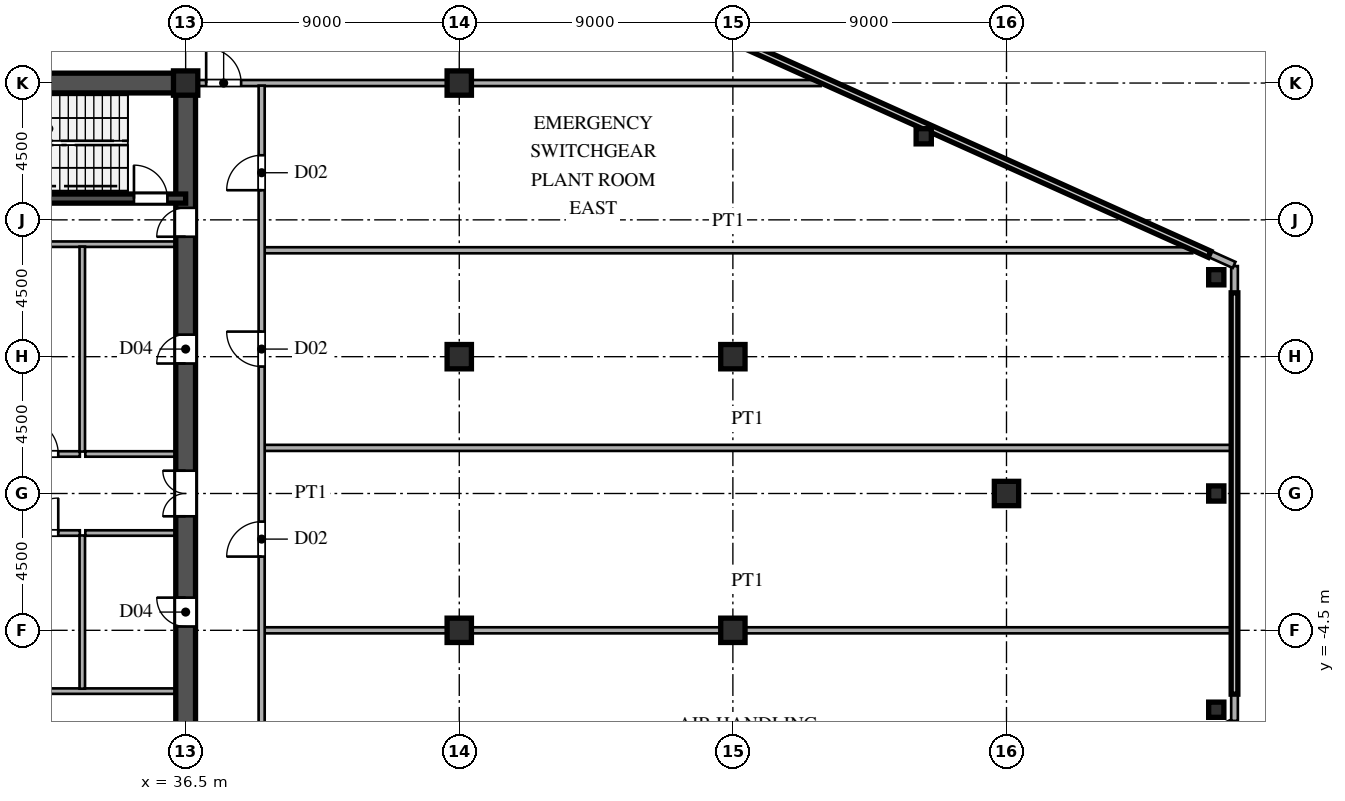
"""IFC4 building model, lengths in metres.
Left out: names, types, materials, properties, quantities, classifications, styles, units other than length and angle.
Written with IfcOpenShell. Run it as: python <this file> out.ifc"""

import sys

from ifc_helpers import new_model, si_unit, direction, frame, frame_2d, origin, origin_2d, place, context, subcontext, project, spatial, rectangle, hollow_rectangle, i_section, extrude, source, transform, mapped, element, fill, save


model = new_model("IFC4")
c1 = context("Model", 3, precision=1e-05, world=origin(), true_north=direction((0.0, 1.0)))
c2 = subcontext(c1, "Body", "Model", "MODEL_VIEW")
j1 = project(units=[si_unit("LENGTHUNIT", "METRE"), si_unit("PLANEANGLEUNIT", "RADIAN")], contexts=[c1])
p1 = place(None, origin())
s1 = spatial("IfcSite", under=j1, at=p1, CompositionType="ELEMENT")
p2 = place(p1, origin())
s2 = spatial("IfcBuilding", under=s1, at=p2, CompositionType="ELEMENT")
p3 = place(p2, frame((0.0, 0.0, 87.3)))
s3 = spatial("IfcBuildingStorey", under=s2, at=p3, CompositionType="ELEMENT", Elevation=87.3)
m1 = source(origin(), c2, "Body", "SweptSolid", [
    extrude(i_section(OverallWidth=0.8, OverallDepth=0.8, WebThickness=0.032, FlangeThickness=0.05, at=origin_2d()), origin(), (0.0, 0.0, 1.0), 5.1),
])
for number, where, z_axis, x_axis in (
    (1, (36.5, 13.5, 0.0), (0.0, 0.0, 1.0), (1.0, 0.0, 0.0)),
    (2, (45.5, -4.5, 0.0), (0.0, 0.0, 1.0), (1.0, 0.0, 0.0)),
    (3, (45.5, 4.5, 0.0), (0.0, 0.0, 1.0), (1.0, 0.0, 0.0)),
    (4, (45.5, 13.5, 0.0), (0.0, 0.0, 1.0), (1.0, 0.0, 0.0)),
    (5, (54.5, -4.5, 0.0), (0.0, 0.0, 1.0), (1.0, 0.0, 0.0)),
    (6, (54.5, 4.5, 0.0), (0.0, 0.0, 1.0), (1.0, 0.0, 0.0)),
    (7, (63.5, 0.0, 0.0), (0.0, 0.0, 1.0), (1.0, 0.0, 0.0)),
):
    element("IfcColumn", number, at=place(p3, frame(where, z_axis=z_axis, x_axis=x_axis)), inside=s3, PredefinedType="COLUMN", context=c2, shape_type="MappedRepresentation", body=[
        mapped(m1, transform((0.0, 0.0, 0.0), scale=1.0)),
    ])
m2 = source(origin(), c2, "Body", "SweptSolid", [
    extrude(hollow_rectangle(XDim=0.5, YDim=0.5, WallThickness=0.02, at=origin_2d()), origin(), (0.0, 0.0, 1.0), 5.1),
])
for number, where, z_axis, x_axis in (
    (8, (70.4, -7.112, 0.0), (0.0, 0.0, 1.0), (1.0, 0.0, 0.0)),
    (9, (70.4, 7.112, 0.0), (0.0, 0.0, 1.0), (1.0, 0.0, 0.0)),
    (10, (60.778, 11.749, 0.0), (0.0, 0.0, 1.0), (1.0, 0.0, 0.0)),
    (11, (70.4, 0.0, 0.0), (0.0, 0.0, 1.0), (1.0, 0.0, 0.0)),
):
    element("IfcColumn", number, at=place(p3, frame(where, z_axis=z_axis, x_axis=x_axis)), inside=s3, PredefinedType="COLUMN", context=c2, shape_type="MappedRepresentation", body=[
        mapped(m2, transform((0.0, 0.0, 0.0), scale=1.0)),
    ])
p4 = place(p3, frame((31.018, -25.492, 0.0), z_axis=(0.0, 0.0, 1.0), x_axis=(0.911922547569, 0.410362360889, 0.0)))
e12 = element("IfcWall", 12, at=p4, inside=s3, PredefinedType="PARAPET", context=c2, shape_type="SweptSolid", body=[
    extrude(rectangle(XDim=43.823, YDim=0.22, at=frame_2d((21.912, 0.0))), origin(), (0.0, 0.0, 1.0), 1.25),
])
p5 = place(p3, frame((71.0, -7.48, 0.0), z_axis=(0.0, 0.0, 1.0), x_axis=(0.0, 1.0, 0.0)))
e13 = element("IfcWall", 13, at=p5, inside=s3, PredefinedType="PARAPET", context=c2, shape_type="SweptSolid", body=[
    extrude(rectangle(XDim=14.96, YDim=0.22, at=frame_2d((7.48, 0.0))), origin(), (0.0, 0.0, 1.0), 1.25),
])
p6 = place(p3, frame((70.982, 7.508, 0.0), z_axis=(0.0, 0.0, 1.0), x_axis=(-0.911922547569, 0.410362360889, 0.0)))
e14 = element("IfcWall", 14, at=p6, inside=s3, PredefinedType="PARAPET", context=c2, shape_type="SweptSolid", body=[
    extrude(rectangle(XDim=43.823, YDim=0.22, at=frame_2d((21.912, 0.0))), origin(), (0.0, 0.0, 1.0), 1.25),
])
p7 = place(p3, frame((27.5, 13.5, 0.0), z_axis=(0.0, 0.0, 1.0), x_axis=(1.0, 0.0, 0.0)))
e15 = element("IfcWall", 15, at=p7, inside=s3, PredefinedType="SHEAR", context=c2, shape_type="SweptSolid", body=[
    extrude(rectangle(XDim=9.0, YDim=0.65, at=frame_2d((4.5, 0.0))), origin(), (0.0, 0.0, 1.0), 4.88),
])
p8 = place(p3, frame((36.5, -13.65, 0.0), z_axis=(0.0, 0.0, 1.0), x_axis=(0.0, 1.0, 0.0)))
e16 = element("IfcWall", 16, at=p8, inside=s3, PredefinedType="SHEAR", context=c2, shape_type="SweptSolid", body=[
    extrude(rectangle(XDim=7.15, YDim=0.65, at=frame_2d((3.575, 0.0))), origin(), (0.0, 0.0, 1.0), 4.88),
])
p9 = place(p8, frame((4.675, 0.0, 0.0)))
e17 = element("IfcOpeningElement", 17, at=p9, cuts=e16, PredefinedType="OPENING", context=c2, shape_type="SweptSolid", body=[
    extrude(rectangle(XDim=1.15, YDim=2.2, at=frame_2d((0.575, 1.1))), frame((0.0, 0.335, 0.0), z_axis=(0.0, -1.0, 0.0), x_axis=(1.0, 0.0, 0.0)), (0.0, 0.0, 1.0), 0.67),
])
p10 = place(p3, frame((36.5, -1.3, 0.0), z_axis=(0.0, 0.0, 1.0), x_axis=(0.0, 1.0, 0.0)))
e18 = element("IfcWall", 18, at=p10, inside=s3, PredefinedType="SHEAR", context=c2, shape_type="SweptSolid", body=[
    extrude(rectangle(XDim=2.6, YDim=0.65, at=frame_2d((1.3, 0.0))), origin(), (0.0, 0.0, 1.0), 4.88),
])
p11 = place(p10, frame((0.55, 0.0, 0.0)))
e19 = element("IfcOpeningElement", 19, at=p11, cuts=e18, PredefinedType="OPENING", context=c2, shape_type="SweptSolid", body=[
    extrude(rectangle(XDim=1.5, YDim=2.3, at=frame_2d((0.75, 1.15))), frame((0.0, 0.335, 0.0), z_axis=(0.0, -1.0, 0.0), x_axis=(1.0, 0.0, 0.0)), (0.0, 0.0, 1.0), 0.67),
])
p12 = place(p3, frame((36.5, 8.2, 0.0), z_axis=(0.0, 0.0, 1.0), x_axis=(0.0, 1.0, 0.0)))
e20 = element("IfcWall", 20, at=p12, inside=s3, PredefinedType="SHEAR", context=c2, shape_type="SweptSolid", body=[
    extrude(rectangle(XDim=5.45, YDim=0.65, at=frame_2d((2.725, 0.0))), origin(), (0.0, 0.0, 1.0), 4.88),
])
p13 = place(p12, frame((0.245, 0.0, 0.0)))
e21 = element("IfcOpeningElement", 21, at=p13, cuts=e20, PredefinedType="OPENING", context=c2, shape_type="SweptSolid", body=[
    extrude(rectangle(XDim=0.95, YDim=2.15, at=frame_2d((0.475, 1.075))), frame((0.0, 0.335, 0.0), z_axis=(0.0, -1.0, 0.0), x_axis=(1.0, 0.0, 0.0)), (0.0, 0.0, 1.0), 0.67),
])
p14 = place(p3, frame((36.5, -6.5, 0.0), z_axis=(0.0, 0.0, 1.0), x_axis=(0.0, 1.0, 0.0)))
e22 = element("IfcWall", 22, at=p14, inside=s3, PredefinedType="SHEAR", context=c2, shape_type="SweptSolid", body=[
    extrude(rectangle(XDim=5.2, YDim=0.65, at=frame_2d((2.6, 0.0))), origin(), (0.0, 0.0, 1.0), 4.88),
])
p15 = place(p14, frame((2.125, 0.0, 0.0)))
e23 = element("IfcOpeningElement", 23, at=p15, cuts=e22, PredefinedType="OPENING", context=c2, shape_type="SweptSolid", body=[
    extrude(rectangle(XDim=0.95, YDim=2.15, at=frame_2d((0.475, 1.075))), frame((0.0, 0.335, 0.0), z_axis=(0.0, -1.0, 0.0), x_axis=(1.0, 0.0, 0.0)), (0.0, 0.0, 1.0), 0.67),
])
p16 = place(p3, frame((36.5, 1.3, 0.0), z_axis=(0.0, 0.0, 1.0), x_axis=(0.0, 1.0, 0.0)))
e24 = element("IfcWall", 24, at=p16, inside=s3, PredefinedType="SHEAR", context=c2, shape_type="SweptSolid", body=[
    extrude(rectangle(XDim=6.9, YDim=0.65, at=frame_2d((3.45, 0.0))), origin(), (0.0, 0.0, 1.0), 4.88),
])
p17 = place(p16, frame((2.975, 0.0, 0.0)))
e25 = element("IfcOpeningElement", 25, at=p17, cuts=e24, PredefinedType="OPENING", context=c2, shape_type="SweptSolid", body=[
    extrude(rectangle(XDim=0.95, YDim=2.15, at=frame_2d((0.475, 1.075))), frame((0.0, 0.335, 0.0), z_axis=(0.0, -1.0, 0.0), x_axis=(1.0, 0.0, 0.0)), (0.0, 0.0, 1.0), 0.67),
])
p18 = place(p3, frame((27.5, 9.7, 0.0), z_axis=(0.0, 0.0, 1.0), x_axis=(1.0, 0.0, 0.0)))
e26 = element("IfcWall", 26, at=p18, inside=s3, PredefinedType="SHEAR", context=c2, shape_type="SweptSolid", body=[
    extrude(rectangle(XDim=9.0, YDim=0.3, at=frame_2d((4.5, 0.0))), origin(), (0.0, 0.0, 1.0), 4.88),
])
p19 = place(p18, frame((7.3, 0.0, 0.0)))
e27 = element("IfcOpeningElement", 27, at=p19, cuts=e26, PredefinedType="OPENING", context=c2, shape_type="SweptSolid", body=[
    extrude(rectangle(XDim=1.1, YDim=2.2, at=frame_2d((0.55, 1.1))), frame((0.0, 0.16, 0.0), z_axis=(0.0, -1.0, 0.0), x_axis=(1.0, 0.0, 0.0)), (0.0, 0.0, 1.0), 0.32),
])
for number, where, z_axis, x_axis in (
    (28, (30.45, -6.5, 0.0), (0.0, 0.0, 1.0), (1.0, 0.0, 0.0)),
    (29, (30.45, 8.2, 0.0), (0.0, 0.0, 1.0), (1.0, 0.0, 0.0)),
):
    element("IfcWall", number, at=place(p3, frame(where, z_axis=z_axis, x_axis=x_axis)), inside=s3, PredefinedType="PARTITIONING", context=c2, shape_type="SweptSolid", body=[
        extrude(rectangle(XDim=5.7, YDim=0.18, at=frame_2d((2.85, 0.0))), origin(), (0.0, 0.0, 1.0), 4.88),
    ])
p20 = place(p3, frame((33.1, -6.42, 0.0), z_axis=(0.0, 0.0, 1.0), x_axis=(0.0, 1.0, 0.0)))
e30 = element("IfcWall", 30, at=p20, inside=s3, PredefinedType="PARTITIONING", context=c2, shape_type="SweptSolid", body=[
    extrude(rectangle(XDim=5.04, YDim=0.18, at=frame_2d((2.52, 0.0))), origin(), (0.0, 0.0, 1.0), 4.88),
])
p21 = place(p3, frame((33.1, 1.38, 0.0), z_axis=(0.0, 0.0, 1.0), x_axis=(0.0, 1.0, 0.0)))
e31 = element("IfcWall", 31, at=p21, inside=s3, PredefinedType="PARTITIONING", context=c2, shape_type="SweptSolid", body=[
    extrude(rectangle(XDim=6.74, YDim=0.18, at=frame_2d((3.37, 0.0))), origin(), (0.0, 0.0, 1.0), 4.88),
])
p22 = place(p3, frame((30.45, -1.3, 0.0), z_axis=(0.0, 0.0, 1.0), x_axis=(1.0, 0.0, 0.0)))
e32 = element("IfcWall", 32, at=p22, inside=s3, PredefinedType="PARTITIONING", context=c2, shape_type="SweptSolid", body=[
    extrude(rectangle(XDim=2.57, YDim=0.18, at=frame_2d((1.285, 0.0))), origin(), (0.0, 0.0, 1.0), 4.88),
])
p23 = place(p22, frame((0.71, 0.0, 0.0)))
e33 = element("IfcOpeningElement", 33, at=p23, cuts=e32, PredefinedType="OPENING", context=c2, shape_type="SweptSolid", body=[
    extrude(rectangle(XDim=1.15, YDim=2.2, at=frame_2d((0.575, 1.1))), frame((0.0, 0.1, 0.0), z_axis=(0.0, -1.0, 0.0), x_axis=(1.0, 0.0, 0.0)), (0.0, 0.0, 1.0), 0.2),
])
p24 = place(p3, frame((30.45, 1.3, 0.0), z_axis=(0.0, 0.0, 1.0), x_axis=(1.0, 0.0, 0.0)))
e34 = element("IfcWall", 34, at=p24, inside=s3, PredefinedType="PARTITIONING", context=c2, shape_type="SweptSolid", body=[
    extrude(rectangle(XDim=2.57, YDim=0.18, at=frame_2d((1.285, 0.0))), origin(), (0.0, 0.0, 1.0), 4.88),
])
p25 = place(p24, frame((0.71, 0.0, 0.0)))
e35 = element("IfcOpeningElement", 35, at=p25, cuts=e34, PredefinedType="OPENING", context=c2, shape_type="SweptSolid", body=[
    extrude(rectangle(XDim=1.15, YDim=2.2, at=frame_2d((0.575, 1.1))), frame((0.0, 0.1, 0.0), z_axis=(0.0, -1.0, 0.0), x_axis=(1.0, 0.0, 0.0)), (0.0, 0.0, 1.0), 0.2),
])
for number, where, z_axis, x_axis in (
    (36, (33.2, -1.3, 0.0), (0.0, 0.0, 1.0), (1.0, 0.0, 0.0)),
    (37, (33.2, 1.3, 0.0), (0.0, 0.0, 1.0), (1.0, 0.0, 0.0)),
):
    element("IfcWall", number, at=place(p3, frame(where, z_axis=z_axis, x_axis=x_axis)), inside=s3, PredefinedType="PARTITIONING", context=c2, shape_type="SweptSolid", body=[
        extrude(rectangle(XDim=2.95, YDim=0.18, at=frame_2d((1.475, 0.0))), origin(), (0.0, 0.0, 1.0), 4.88),
    ])
p26 = place(p3, frame((39.085, -4.5, 0.0), z_axis=(0.0, 0.0, 1.0), x_axis=(1.0, 0.0, 0.0)))
e38 = element("IfcWall", 38, at=p26, inside=s3, PredefinedType="PARTITIONING", context=c2, shape_type="SweptSolid", body=[
    extrude(rectangle(XDim=15.435, YDim=0.2, at=frame_2d((7.718, 0.0))), origin(), (0.0, 0.0, 1.0), 4.18),
])
p27 = place(p3, frame((54.52, -4.5, 0.0), z_axis=(0.0, 0.0, 1.0), x_axis=(1.0, 0.0, 0.0)))
e39 = element("IfcWall", 39, at=p27, inside=s3, PredefinedType="PARTITIONING", context=c2, shape_type="SweptSolid", body=[
    extrude(rectangle(XDim=16.365, YDim=0.2, at=frame_2d((8.183, 0.0))), origin(), (0.0, 0.0, 1.0), 4.88),
])
p28 = place(p3, frame((39.085, 1.5, 0.0), z_axis=(0.0, 0.0, 1.0), x_axis=(1.0, 0.0, 0.0)))
e40 = element("IfcWall", 40, at=p28, inside=s3, PredefinedType="PARTITIONING", context=c2, shape_type="SweptSolid", body=[
    extrude(rectangle(XDim=31.8, YDim=0.2, at=frame_2d((15.9, 0.0))), origin(), (0.0, 0.0, 1.0), 4.88),
])
p29 = place(p3, frame((39.085, 8.0, 0.0), z_axis=(0.0, 0.0, 1.0), x_axis=(1.0, 0.0, 0.0)))
e41 = element("IfcWall", 41, at=p29, inside=s3, PredefinedType="PARTITIONING", context=c2, shape_type="SweptSolid", body=[
    extrude(rectangle(XDim=30.524, YDim=0.2, at=frame_2d((15.262, 0.0))), origin(), (0.0, 0.0, 1.0), 4.88),
])
p30 = place(p3, frame((36.83, 13.5, 0.0), z_axis=(0.0, 0.0, 1.0), x_axis=(1.0, 0.0, 0.0)))
e42 = element("IfcWall", 42, at=p30, inside=s3, PredefinedType="PARTITIONING", context=c2, shape_type="SweptSolid", body=[
    extrude(rectangle(XDim=8.69, YDim=0.2, at=frame_2d((4.345, 0.0))), origin(), (0.0, 0.0, 1.0), 4.18),
])
p31 = place(p30, frame((0.345, 0.0, 0.0)))
e43 = element("IfcOpeningElement", 43, at=p31, cuts=e42, PredefinedType="OPENING", context=c2, shape_type="SweptSolid", body=[
    extrude(rectangle(XDim=1.15, YDim=2.2, at=frame_2d((0.575, 1.1))), frame((0.0, 0.11, 0.0), z_axis=(0.0, -1.0, 0.0), x_axis=(1.0, 0.0, 0.0)), (0.0, 0.0, 1.0), 0.22),
])
p32 = place(p3, frame((45.52, 13.5, 0.0), z_axis=(0.0, 0.0, 1.0), x_axis=(1.0, 0.0, 0.0)))
e44 = element("IfcWall", 44, at=p32, inside=s3, PredefinedType="PARTITIONING", context=c2, shape_type="SweptSolid", body=[
    extrude(rectangle(XDim=11.866, YDim=0.2, at=frame_2d((5.933, 0.0))), origin(), (0.0, 0.0, 1.0), 4.88),
])
p33 = place(p3, frame((39.0, -13.415, 0.0), z_axis=(0.0, 0.0, 1.0), x_axis=(0.0, 1.0, 0.0)))
e45 = element("IfcWall", 45, at=p33, inside=s3, PredefinedType="PARTITIONING", context=c2, shape_type="SweptSolid", body=[
    extrude(rectangle(XDim=26.83, YDim=0.2, at=frame_2d((13.415, 0.0))), origin(), (0.0, 0.0, 1.0), 4.88),
])
p34 = place(p33, frame((4.04, 0.0, 0.0)))
e46 = element("IfcOpeningElement", 46, at=p34, cuts=e45, PredefinedType="OPENING", context=c2, shape_type="SweptSolid", body=[
    extrude(rectangle(XDim=1.15, YDim=2.2, at=frame_2d((0.575, 1.1))), frame((0.0, 0.11, 0.0), z_axis=(0.0, -1.0, 0.0), x_axis=(1.0, 0.0, 0.0)), (0.0, 0.0, 1.0), 0.22),
])
p35 = place(p33, frame((11.34, 0.0, 0.0)))
e47 = element("IfcOpeningElement", 47, at=p35, cuts=e45, PredefinedType="OPENING", context=c2, shape_type="SweptSolid", body=[
    extrude(rectangle(XDim=1.15, YDim=2.2, at=frame_2d((0.575, 1.1))), frame((0.0, 0.11, 0.0), z_axis=(0.0, -1.0, 0.0), x_axis=(1.0, 0.0, 0.0)), (0.0, 0.0, 1.0), 0.22),
])
p36 = place(p33, frame((17.59, 0.0, 0.0)))
e48 = element("IfcOpeningElement", 48, at=p36, cuts=e45, PredefinedType="OPENING", context=c2, shape_type="SweptSolid", body=[
    extrude(rectangle(XDim=1.15, YDim=2.2, at=frame_2d((0.575, 1.1))), frame((0.0, 0.11, 0.0), z_axis=(0.0, -1.0, 0.0), x_axis=(1.0, 0.0, 0.0)), (0.0, 0.0, 1.0), 0.22),
])
p37 = place(p33, frame((23.39, 0.0, 0.0)))
e49 = element("IfcOpeningElement", 49, at=p37, cuts=e45, PredefinedType="OPENING", context=c2, shape_type="SweptSolid", body=[
    extrude(rectangle(XDim=1.15, YDim=2.2, at=frame_2d((0.575, 1.1))), frame((0.0, 0.11, 0.0), z_axis=(0.0, -1.0, 0.0), x_axis=(1.0, 0.0, 0.0)), (0.0, 0.0, 1.0), 0.22),
])
m3 = source(origin(), c2, "Body", "SweptSolid", [
    extrude(rectangle(XDim=1.5, YDim=2.3, at=frame_2d((0.75, 1.15))), frame((0.0, 0.025, 0.0), z_axis=(0.0, -1.0, 0.0), x_axis=(1.0, 0.0, 0.0)), (0.0, 0.0, 1.0), 0.05),
])
p38 = place(p11, origin())
e50 = element("IfcDoor", 50, at=p38, inside=s3, OperationType="DOUBLE_SWING_LEFT", PredefinedType="DOOR", context=c2, shape_type="MappedRepresentation", body=[
    mapped(m3, transform((0.0, 0.0, 0.0), scale=1.0)),
])
fill(e19, e50)
m4 = source(origin(), c2, "Body", "SweptSolid", [
    extrude(rectangle(XDim=0.95, YDim=2.15, at=frame_2d((0.475, 1.075))), frame((0.0, 0.025, 0.0), z_axis=(0.0, -1.0, 0.0), x_axis=(1.0, 0.0, 0.0)), (0.0, 0.0, 1.0), 0.05),
])
p39 = place(p13, origin())
e51 = element("IfcDoor", 51, at=p39, inside=s3, OperationType="SINGLE_SWING_LEFT", PredefinedType="DOOR", context=c2, shape_type="MappedRepresentation", body=[
    mapped(m4, transform((0.0, 0.0, 0.0), scale=1.0)),
])
fill(e21, e51)
p40 = place(p15, origin())
e52 = element("IfcDoor", 52, at=p40, inside=s3, OperationType="SINGLE_SWING_RIGHT", PredefinedType="DOOR", context=c2, shape_type="MappedRepresentation", body=[
    mapped(m4, transform((0.0, 0.0, 0.0), scale=1.0)),
])
fill(e23, e52)
p41 = place(p17, origin())
e53 = element("IfcDoor", 53, at=p41, inside=s3, OperationType="SINGLE_SWING_LEFT", PredefinedType="DOOR", context=c2, shape_type="MappedRepresentation", body=[
    mapped(m4, transform((0.0, 0.0, 0.0), scale=1.0)),
])
fill(e25, e53)
m5 = source(origin(), c2, "Body", "SweptSolid", [
    extrude(rectangle(XDim=1.1, YDim=2.2, at=frame_2d((0.55, 1.1))), frame((0.0, 0.025, 0.0), z_axis=(0.0, -1.0, 0.0), x_axis=(1.0, 0.0, 0.0)), (0.0, 0.0, 1.0), 0.05),
])
p42 = place(p19, origin())
e54 = element("IfcDoor", 54, at=p42, inside=s3, OperationType="SINGLE_SWING_LEFT", PredefinedType="DOOR", context=c2, shape_type="MappedRepresentation", body=[
    mapped(m5, transform((0.0, 0.0, 0.0), scale=1.0)),
])
fill(e27, e54)
m6 = source(origin(), c2, "Body", "SweptSolid", [
    extrude(rectangle(XDim=1.15, YDim=2.2, at=frame_2d((0.575, 1.1))), frame((0.0, 0.025, 0.0), z_axis=(0.0, -1.0, 0.0), x_axis=(1.0, 0.0, 0.0)), (0.0, 0.0, 1.0), 0.05),
])
p43 = place(p23, origin())
e55 = element("IfcDoor", 55, at=p43, inside=s3, OperationType="SINGLE_SWING_RIGHT", PredefinedType="DOOR", context=c2, shape_type="MappedRepresentation", body=[
    mapped(m6, transform((0.0, 0.0, 0.0), scale=1.0)),
])
fill(e33, e55)
p44 = place(p25, origin())
e56 = element("IfcDoor", 56, at=p44, inside=s3, OperationType="SINGLE_SWING_LEFT", PredefinedType="DOOR", context=c2, shape_type="MappedRepresentation", body=[
    mapped(m6, transform((0.0, 0.0, 0.0), scale=1.0)),
])
fill(e35, e56)
p45 = place(p31, origin())
e57 = element("IfcDoor", 57, at=p45, inside=s3, OperationType="SINGLE_SWING_LEFT", PredefinedType="DOOR", context=c2, shape_type="MappedRepresentation", body=[
    mapped(m6, transform((0.0, 0.0, 0.0), scale=1.0)),
])
fill(e43, e57)
p46 = place(p35, origin())
e58 = element("IfcDoor", 58, at=p46, inside=s3, OperationType="SINGLE_SWING_LEFT", PredefinedType="DOOR", context=c2, shape_type="MappedRepresentation", body=[
    mapped(m6, transform((0.0, 0.0, 0.0), scale=1.0)),
])
fill(e47, e58)
p47 = place(p36, origin())
e59 = element("IfcDoor", 59, at=p47, inside=s3, OperationType="SINGLE_SWING_RIGHT", PredefinedType="DOOR", context=c2, shape_type="MappedRepresentation", body=[
    mapped(m6, transform((0.0, 0.0, 0.0), scale=1.0)),
])
fill(e48, e59)
p48 = place(p37, origin())
e60 = element("IfcDoor", 60, at=p48, inside=s3, OperationType="SINGLE_SWING_LEFT", PredefinedType="DOOR", context=c2, shape_type="MappedRepresentation", body=[
    mapped(m6, transform((0.0, 0.0, 0.0), scale=1.0)),
])
fill(e49, e60)
save(model, sys.argv[1])
